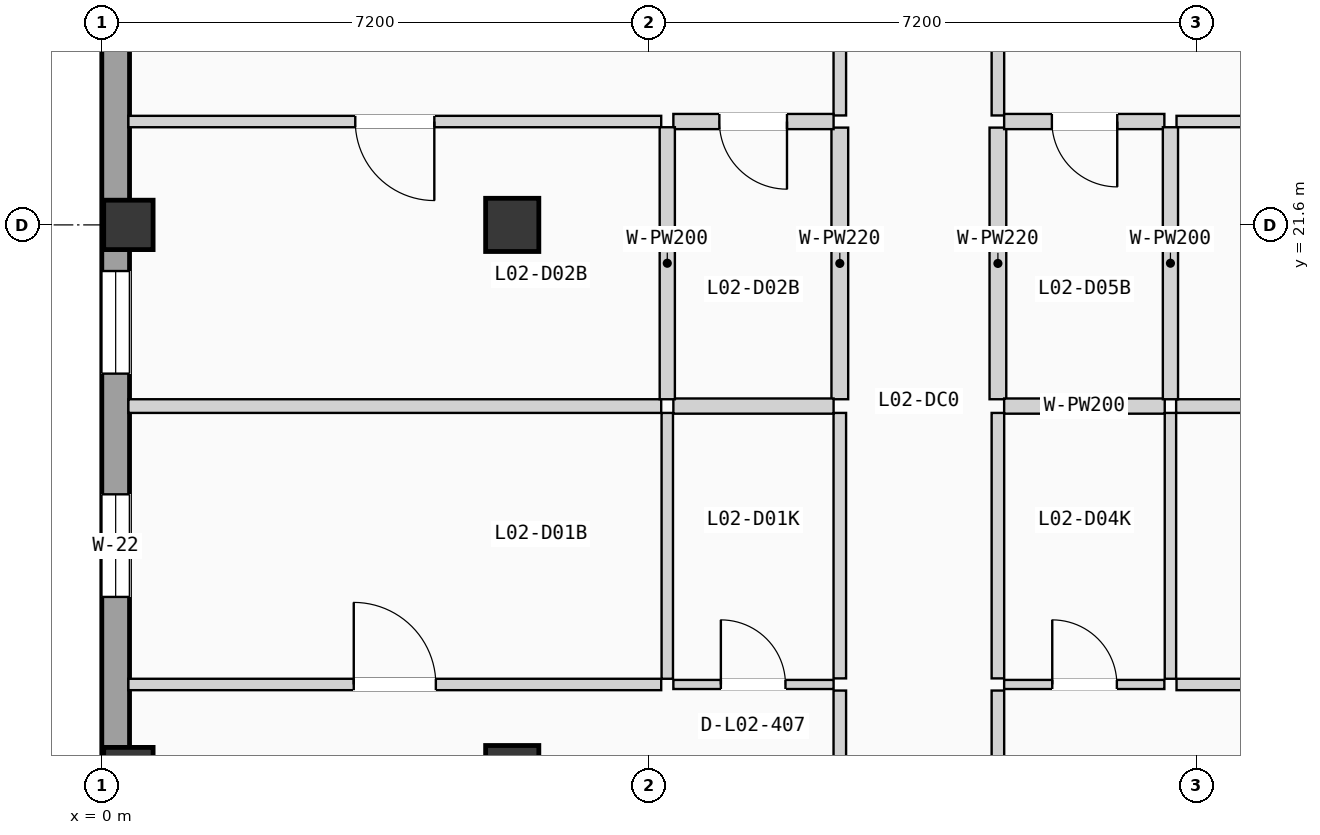
"""IFC4 building model, lengths in metres.
Left out: names, types, materials, properties, quantities, classifications, styles, units other than length and angle.
Written with IfcOpenShell. Run it as: python <this file> out.ifc"""

import sys

from ifc_helpers import new_model, si_unit, direction, frame, frame_2d, origin, origin_2d, place, context, subcontext, project, spatial, rectangle, extrude, element, fill, save


model = new_model("IFC4")
c1 = context("Model", 3, precision=1e-05, world=origin(), true_north=direction((0.0, 1.0)))
c2 = subcontext(c1, "Body", "Model", "MODEL_VIEW")
j1 = project(units=[si_unit("LENGTHUNIT", "METRE"), si_unit("PLANEANGLEUNIT", "RADIAN")], contexts=[c1])
p1 = place(None, origin())
s1 = spatial("IfcSite", under=j1, at=p1, CompositionType="ELEMENT")
p2 = place(p1, origin())
s2 = spatial("IfcBuilding", under=s1, at=p2, CompositionType="ELEMENT")
p3 = place(p2, frame((0.0, 0.0, 8.575)))
s3 = spatial("IfcBuildingStorey", under=s2, at=p3, CompositionType="ELEMENT", Elevation=8.575)
for number, where, z_axis, x_axis in (
    (1, (0.35, 14.4, 0.0), (0.0, 0.0, 1.0), (1.0, 0.0, 0.0)),
    (2, (0.35, 21.6, 0.0), (0.0, 0.0, 1.0), (1.0, 0.0, 0.0)),
):
    element("IfcColumn", number, at=place(p3, frame(where, z_axis=z_axis, x_axis=x_axis)), inside=s3, PredefinedType="COLUMN", context=c2, shape_type="SweptSolid", body=[
        extrude(rectangle(XDim=0.65, YDim=0.65, at=origin_2d()), origin(), (0.0, 0.0, 1.0), 3.5),
    ])
for number, where, z_axis, x_axis in (
    (3, (5.4, 14.4, 0.0), (0.0, 0.0, 1.0), (1.0, 0.0, 0.0)),
    (4, (5.4, 21.6, 0.0), (0.0, 0.0, 1.0), (1.0, 0.0, 0.0)),
):
    element("IfcColumn", number, at=place(p3, frame(where, z_axis=z_axis, x_axis=x_axis)), inside=s3, PredefinedType="COLUMN", context=c2, shape_type="SweptSolid", body=[
        extrude(rectangle(XDim=0.7, YDim=0.7, at=origin_2d()), origin(), (0.0, 0.0, 1.0), 3.5),
    ])
p4 = place(p3, frame((0.183, 0.365, 0.0), z_axis=(0.0, 0.0, 1.0), x_axis=(0.0, 1.0, 0.0)))
e5 = element("IfcWall", 5, at=p4, inside=s3, PredefinedType="SOLIDWALL", context=c2, shape_type="SweptSolid", body=[
    extrude(rectangle(XDim=49.67, YDim=0.365, at=frame_2d((24.835, 0.0))), origin(), (0.0, 0.0, 1.0), 3.24),
])
p5 = place(p4, frame((11.701, 0.0, 0.755)))
e6 = element("IfcOpeningElement", 6, at=p5, cuts=e5, PredefinedType="OPENING", context=c2, shape_type="SweptSolid", body=[
    extrude(rectangle(XDim=1.25, YDim=1.8, at=frame_2d((0.625, 0.9))), frame((0.0, 0.192, 0.0), z_axis=(0.0, -1.0, 0.0), x_axis=(1.0, 0.0, 0.0)), (0.0, 0.0, 1.0), 0.385),
])
p6 = place(p4, frame((8.306, 0.0, 0.9)))
e7 = element("IfcOpeningElement", 7, at=p6, cuts=e5, PredefinedType="OPENING", context=c2, shape_type="SweptSolid", body=[
    extrude(rectangle(XDim=1.35, YDim=1.2, at=frame_2d((0.675, 0.6))), frame((0.0, 0.192, 0.0), z_axis=(0.0, -1.0, 0.0), x_axis=(1.0, 0.0, 0.0)), (0.0, 0.0, 1.0), 0.385),
])
p7 = place(p4, frame((16.34, 0.0, 0.9)))
e8 = element("IfcOpeningElement", 8, at=p7, cuts=e5, PredefinedType="OPENING", context=c2, shape_type="SweptSolid", body=[
    extrude(rectangle(XDim=1.35, YDim=1.35, at=frame_2d((0.675, 0.675))), frame((0.0, 0.192, 0.0), z_axis=(0.0, -1.0, 0.0), x_axis=(1.0, 0.0, 0.0)), (0.0, 0.0, 1.0), 0.385),
])
p8 = place(p4, frame((24.16, 0.0, 0.9)))
e9 = element("IfcOpeningElement", 9, at=p8, cuts=e5, PredefinedType="OPENING", context=c2, shape_type="SweptSolid", body=[
    extrude(rectangle(XDim=1.35, YDim=1.5, at=frame_2d((0.675, 0.75))), frame((0.0, 0.192, 0.0), z_axis=(0.0, -1.0, 0.0), x_axis=(1.0, 0.0, 0.0)), (0.0, 0.0, 1.0), 0.385),
])
p9 = place(p4, frame((19.278, 0.0, 0.9)))
e10 = element("IfcOpeningElement", 10, at=p9, cuts=e5, PredefinedType="OPENING", context=c2, shape_type="SweptSolid", body=[
    extrude(rectangle(XDim=1.35, YDim=1.65, at=frame_2d((0.675, 0.825))), frame((0.0, 0.192, 0.0), z_axis=(0.0, -1.0, 0.0), x_axis=(1.0, 0.0, 0.0)), (0.0, 0.0, 1.0), 0.385),
])
p10 = place(p4, frame((29.042, 0.0, 0.755)))
e11 = element("IfcOpeningElement", 11, at=p10, cuts=e5, PredefinedType="OPENING", context=c2, shape_type="SweptSolid", body=[
    extrude(rectangle(XDim=1.35, YDim=1.8, at=frame_2d((0.675, 0.9))), frame((0.0, 0.192, 0.0), z_axis=(0.0, -1.0, 0.0), x_axis=(1.0, 0.0, 0.0)), (0.0, 0.0, 1.0), 0.385),
])
p11 = place(p4, frame((36.603, 0.0, 0.9)))
e12 = element("IfcOpeningElement", 12, at=p11, cuts=e5, PredefinedType="OPENING", context=c2, shape_type="SweptSolid", body=[
    extrude(rectangle(XDim=1.48, YDim=1.2, at=frame_2d((0.74, 0.6))), frame((0.0, 0.192, 0.0), z_axis=(0.0, -1.0, 0.0), x_axis=(1.0, 0.0, 0.0)), (0.0, 0.0, 1.0), 0.385),
])
p12 = place(p4, frame((31.915, 0.0, 0.9)))
e13 = element("IfcOpeningElement", 13, at=p12, cuts=e5, PredefinedType="OPENING", context=c2, shape_type="SweptSolid", body=[
    extrude(rectangle(XDim=1.48, YDim=1.35, at=frame_2d((0.74, 0.675))), frame((0.0, 0.192, 0.0), z_axis=(0.0, -1.0, 0.0), x_axis=(1.0, 0.0, 0.0)), (0.0, 0.0, 1.0), 0.385),
])
p13 = place(p4, frame((39.948, 0.0, 0.9)))
e14 = element("IfcOpeningElement", 14, at=p13, cuts=e5, PredefinedType="OPENING", context=c2, shape_type="SweptSolid", body=[
    extrude(rectangle(XDim=1.48, YDim=1.5, at=frame_2d((0.74, 0.75))), frame((0.0, 0.192, 0.0), z_axis=(0.0, -1.0, 0.0), x_axis=(1.0, 0.0, 0.0)), (0.0, 0.0, 1.0), 0.385),
])
p14 = place(p3, frame((9.71, 11.253, 0.0), z_axis=(0.0, 0.0, 1.0), x_axis=(0.0, 1.0, 0.0)))
e15 = element("IfcWall", 15, at=p14, inside=s3, PredefinedType="PARTITIONING", context=c2, shape_type="SweptSolid", body=[
    extrude(rectangle(XDim=4.22, YDim=0.165, at=frame_2d((2.11, 0.0))), origin(), (0.0, 0.0, 1.0), 3.22),
])
p15 = place(p14, frame((1.585, 0.0, 0.0)))
e16 = element("IfcOpeningElement", 16, at=p15, cuts=e15, PredefinedType="OPENING", context=c2, shape_type="SweptSolid", body=[
    extrude(rectangle(XDim=1.05, YDim=2.13, at=frame_2d((0.525, 1.065))), frame((0.0, 0.093, 0.0), z_axis=(0.0, -1.0, 0.0), x_axis=(1.0, 0.0, 0.0)), (0.0, 0.0, 1.0), 0.185),
])
p16 = place(p3, frame((9.71, 15.633, 0.0), z_axis=(0.0, 0.0, 1.0), x_axis=(0.0, 1.0, 0.0)))
e17 = element("IfcWall", 17, at=p16, inside=s3, PredefinedType="PARTITIONING", context=c2, shape_type="SweptSolid", body=[
    extrude(rectangle(XDim=3.493, YDim=0.165, at=frame_2d((1.747, 0.0))), origin(), (0.0, 0.0, 1.0), 3.22),
])
p17 = place(p3, frame((9.71, 23.04, 0.0), z_axis=(0.0, 0.0, 1.0), x_axis=(0.0, 1.0, 0.0)))
e18 = element("IfcWall", 18, at=p17, inside=s3, PredefinedType="PARTITIONING", context=c2, shape_type="SweptSolid", body=[
    extrude(rectangle(XDim=4.32, YDim=0.165, at=frame_2d((2.16, 0.0))), origin(), (0.0, 0.0, 1.0), 3.22),
])
p18 = place(p17, frame((1.635, 0.0, 0.0)))
e19 = element("IfcOpeningElement", 19, at=p18, cuts=e18, PredefinedType="OPENING", context=c2, shape_type="SweptSolid", body=[
    extrude(rectangle(XDim=1.05, YDim=2.13, at=frame_2d((0.525, 1.065))), frame((0.0, 0.093, 0.0), z_axis=(0.0, -1.0, 0.0), x_axis=(1.0, 0.0, 0.0)), (0.0, 0.0, 1.0), 0.185),
])
p19 = place(p3, frame((9.71, 19.306, 0.0), z_axis=(0.0, 0.0, 1.0), x_axis=(0.0, 1.0, 0.0)))
e20 = element("IfcWall", 20, at=p19, inside=s3, PredefinedType="PLUMBINGWALL", context=c2, shape_type="SweptSolid", body=[
    extrude(rectangle(XDim=3.574, YDim=0.22, at=frame_2d((1.787, 0.0))), origin(), (0.0, 0.0, 1.0), 3.22),
])
p20 = place(p3, frame((11.79, 11.253, 0.0), z_axis=(0.0, 0.0, 1.0), x_axis=(0.0, 1.0, 0.0)))
e21 = element("IfcWall", 21, at=p20, inside=s3, PredefinedType="PARTITIONING", context=c2, shape_type="SweptSolid", body=[
    extrude(rectangle(XDim=4.22, YDim=0.165, at=frame_2d((2.11, 0.0))), origin(), (0.0, 0.0, 1.0), 3.22),
])
p21 = place(p20, frame((1.585, 0.0, 0.0)))
e22 = element("IfcOpeningElement", 22, at=p21, cuts=e21, PredefinedType="OPENING", context=c2, shape_type="SweptSolid", body=[
    extrude(rectangle(XDim=1.05, YDim=2.13, at=frame_2d((0.525, 1.065))), frame((0.0, 0.093, 0.0), z_axis=(0.0, -1.0, 0.0), x_axis=(1.0, 0.0, 0.0)), (0.0, 0.0, 1.0), 0.185),
])
p22 = place(p3, frame((11.79, 15.633, 0.0), z_axis=(0.0, 0.0, 1.0), x_axis=(0.0, 1.0, 0.0)))
e23 = element("IfcWall", 23, at=p22, inside=s3, PredefinedType="PARTITIONING", context=c2, shape_type="SweptSolid", body=[
    extrude(rectangle(XDim=3.493, YDim=0.165, at=frame_2d((1.747, 0.0))), origin(), (0.0, 0.0, 1.0), 3.22),
])
p23 = place(p3, frame((11.79, 23.04, 0.0), z_axis=(0.0, 0.0, 1.0), x_axis=(0.0, 1.0, 0.0)))
e24 = element("IfcWall", 24, at=p23, inside=s3, PredefinedType="PARTITIONING", context=c2, shape_type="SweptSolid", body=[
    extrude(rectangle(XDim=4.32, YDim=0.165, at=frame_2d((2.16, 0.0))), origin(), (0.0, 0.0, 1.0), 3.22),
])
p24 = place(p23, frame((1.635, 0.0, 0.0)))
e25 = element("IfcOpeningElement", 25, at=p24, cuts=e24, PredefinedType="OPENING", context=c2, shape_type="SweptSolid", body=[
    extrude(rectangle(XDim=1.05, YDim=2.13, at=frame_2d((0.525, 1.065))), frame((0.0, 0.093, 0.0), z_axis=(0.0, -1.0, 0.0), x_axis=(1.0, 0.0, 0.0)), (0.0, 0.0, 1.0), 0.185),
])
p25 = place(p3, frame((11.79, 19.306, 0.0), z_axis=(0.0, 0.0, 1.0), x_axis=(0.0, 1.0, 0.0)))
e26 = element("IfcWall", 26, at=p25, inside=s3, PredefinedType="PLUMBINGWALL", context=c2, shape_type="SweptSolid", body=[
    extrude(rectangle(XDim=3.574, YDim=0.22, at=frame_2d((1.787, 0.0))), origin(), (0.0, 0.0, 1.0), 3.22),
])
p26 = place(p3, frame((7.52, 15.553, 0.0), z_axis=(0.0, 0.0, 1.0), x_axis=(1.0, 0.0, 0.0)))
e27 = element("IfcWall", 27, at=p26, inside=s3, PredefinedType="PARTITIONING", context=c2, shape_type="SweptSolid", body=[
    extrude(rectangle(XDim=2.108, YDim=0.12, at=frame_2d((1.054, 0.0))), origin(), (0.0, 0.0, 1.0), 3.22),
])
p27 = place(p26, frame((0.625, 0.0, 0.0)))
e28 = element("IfcOpeningElement", 28, at=p27, cuts=e27, PredefinedType="OPENING", context=c2, shape_type="SweptSolid", body=[
    extrude(rectangle(XDim=0.85, YDim=2.01, at=frame_2d((0.425, 1.005))), frame((0.0, 0.07, 0.0), z_axis=(0.0, -1.0, 0.0), x_axis=(1.0, 0.0, 0.0)), (0.0, 0.0, 1.0), 0.14),
])
p28 = place(p3, frame((0.35, 15.553, 0.0), z_axis=(0.0, 0.0, 1.0), x_axis=(1.0, 0.0, 0.0)))
e29 = element("IfcWall", 29, at=p28, inside=s3, PredefinedType="PARTITIONING", context=c2, shape_type="SweptSolid", body=[
    extrude(rectangle(XDim=7.01, YDim=0.15, at=frame_2d((3.505, 0.0))), origin(), (0.0, 0.0, 1.0), 3.22),
])
p29 = place(p28, frame((2.965, 0.0, 0.0)))
e30 = element("IfcOpeningElement", 30, at=p29, cuts=e29, PredefinedType="OPENING", context=c2, shape_type="SweptSolid", body=[
    extrude(rectangle(XDim=1.08, YDim=2.1, at=frame_2d((0.54, 1.05))), frame((0.0, 0.085, 0.0), z_axis=(0.0, -1.0, 0.0), x_axis=(1.0, 0.0, 0.0)), (0.0, 0.0, 1.0), 0.17),
])
p30 = place(p3, frame((7.44, 15.628, 0.0), z_axis=(0.0, 0.0, 1.0), x_axis=(0.0, 1.0, 0.0)))
e31 = element("IfcWall", 31, at=p30, inside=s3, PredefinedType="PARTITIONING", context=c2, shape_type="SweptSolid", body=[
    extrude(rectangle(XDim=3.498, YDim=0.15, at=frame_2d((1.749, 0.0))), origin(), (0.0, 0.0, 1.0), 3.22),
])
p31 = place(p3, frame((7.52, 19.216, 0.0), z_axis=(0.0, 0.0, 1.0), x_axis=(1.0, 0.0, 0.0)))
e32 = element("IfcWall", 32, at=p31, inside=s3, PredefinedType="PLUMBINGWALL", context=c2, shape_type="SweptSolid", body=[
    extrude(rectangle(XDim=2.108, YDim=0.2, at=frame_2d((1.054, 0.0))), origin(), (0.0, 0.0, 1.0), 3.22),
])
p32 = place(p3, frame((0.35, 19.216, 0.0), z_axis=(0.0, 0.0, 1.0), x_axis=(1.0, 0.0, 0.0)))
e33 = element("IfcWall", 33, at=p32, inside=s3, PredefinedType="PARTITIONING", context=c2, shape_type="SweptSolid", body=[
    extrude(rectangle(XDim=7.01, YDim=0.18, at=frame_2d((3.505, 0.0))), origin(), (0.0, 0.0, 1.0), 3.22),
])
p33 = place(p3, frame((7.52, 22.96, 0.0), z_axis=(0.0, 0.0, 1.0), x_axis=(1.0, 0.0, 0.0)))
e34 = element("IfcWall", 34, at=p33, inside=s3, PredefinedType="PLUMBINGWALL", context=c2, shape_type="SweptSolid", body=[
    extrude(rectangle(XDim=2.108, YDim=0.2, at=frame_2d((1.054, 0.0))), origin(), (0.0, 0.0, 1.0), 3.22),
])
p34 = place(p33, frame((0.605, 0.0, 0.0)))
e35 = element("IfcOpeningElement", 35, at=p34, cuts=e34, PredefinedType="OPENING", context=c2, shape_type="SweptSolid", body=[
    extrude(rectangle(XDim=0.89, YDim=2.03, at=frame_2d((0.445, 1.015))), frame((0.0, 0.11, 0.0), z_axis=(0.0, -1.0, 0.0), x_axis=(1.0, 0.0, 0.0)), (0.0, 0.0, 1.0), 0.22),
])
p35 = place(p3, frame((0.35, 22.96, 0.0), z_axis=(0.0, 0.0, 1.0), x_axis=(1.0, 0.0, 0.0)))
e36 = element("IfcWall", 36, at=p35, inside=s3, PredefinedType="PARTITIONING", context=c2, shape_type="SweptSolid", body=[
    extrude(rectangle(XDim=7.01, YDim=0.15, at=frame_2d((3.505, 0.0))), origin(), (0.0, 0.0, 1.0), 3.22),
])
p36 = place(p35, frame((2.985, 0.0, 0.0)))
e37 = element("IfcOpeningElement", 37, at=p36, cuts=e36, PredefinedType="OPENING", context=c2, shape_type="SweptSolid", body=[
    extrude(rectangle(XDim=1.04, YDim=2.08, at=frame_2d((0.52, 1.04))), frame((0.0, 0.085, 0.0), z_axis=(0.0, -1.0, 0.0), x_axis=(1.0, 0.0, 0.0)), (0.0, 0.0, 1.0), 0.17),
])
p37 = place(p3, frame((7.44, 19.306, 0.0), z_axis=(0.0, 0.0, 1.0), x_axis=(0.0, 1.0, 0.0)))
e38 = element("IfcWall", 38, at=p37, inside=s3, PredefinedType="PLUMBINGWALL", context=c2, shape_type="SweptSolid", body=[
    extrude(rectangle(XDim=3.579, YDim=0.2, at=frame_2d((1.79, 0.0))), origin(), (0.0, 0.0, 1.0), 3.22),
])
p38 = place(p3, frame((11.872, 15.553, 0.0), z_axis=(0.0, 0.0, 1.0), x_axis=(1.0, 0.0, 0.0)))
e39 = element("IfcWall", 39, at=p38, inside=s3, PredefinedType="PARTITIONING", context=c2, shape_type="SweptSolid", body=[
    extrude(rectangle(XDim=2.108, YDim=0.12, at=frame_2d((1.054, 0.0))), origin(), (0.0, 0.0, 1.0), 3.22),
])
p39 = place(p38, frame((0.633, 0.0, 0.0)))
e40 = element("IfcOpeningElement", 40, at=p39, cuts=e39, PredefinedType="OPENING", context=c2, shape_type="SweptSolid", body=[
    extrude(rectangle(XDim=0.85, YDim=2.01, at=frame_2d((0.425, 1.005))), frame((0.0, 0.07, 0.0), z_axis=(0.0, -1.0, 0.0), x_axis=(1.0, 0.0, 0.0)), (0.0, 0.0, 1.0), 0.14),
])
p40 = place(p3, frame((14.14, 15.553, 0.0), z_axis=(0.0, 0.0, 1.0), x_axis=(1.0, 0.0, 0.0)))
e41 = element("IfcWall", 41, at=p40, inside=s3, PredefinedType="PARTITIONING", context=c2, shape_type="SweptSolid", body=[
    extrude(rectangle(XDim=7.11, YDim=0.15, at=frame_2d((3.555, 0.0))), origin(), (0.0, 0.0, 1.0), 3.22),
])
p41 = place(p40, frame((3.015, 0.0, 0.0)))
e42 = element("IfcOpeningElement", 42, at=p41, cuts=e41, PredefinedType="OPENING", context=c2, shape_type="SweptSolid", body=[
    extrude(rectangle(XDim=1.08, YDim=2.1, at=frame_2d((0.54, 1.05))), frame((0.0, 0.085, 0.0), z_axis=(0.0, -1.0, 0.0), x_axis=(1.0, 0.0, 0.0)), (0.0, 0.0, 1.0), 0.17),
])
p42 = place(p3, frame((14.06, 15.628, 0.0), z_axis=(0.0, 0.0, 1.0), x_axis=(0.0, 1.0, 0.0)))
e43 = element("IfcWall", 43, at=p42, inside=s3, PredefinedType="PARTITIONING", context=c2, shape_type="SweptSolid", body=[
    extrude(rectangle(XDim=3.498, YDim=0.15, at=frame_2d((1.749, 0.0))), origin(), (0.0, 0.0, 1.0), 3.22),
])
p43 = place(p3, frame((11.872, 19.216, 0.0), z_axis=(0.0, 0.0, 1.0), x_axis=(1.0, 0.0, 0.0)))
e44 = element("IfcWall", 44, at=p43, inside=s3, PredefinedType="PLUMBINGWALL", context=c2, shape_type="SweptSolid", body=[
    extrude(rectangle(XDim=2.113, YDim=0.2, at=frame_2d((1.057, 0.0))), origin(), (0.0, 0.0, 1.0), 3.22),
])
p44 = place(p3, frame((14.135, 19.216, 0.0), z_axis=(0.0, 0.0, 1.0), x_axis=(1.0, 0.0, 0.0)))
e45 = element("IfcWall", 45, at=p44, inside=s3, PredefinedType="PARTITIONING", context=c2, shape_type="SweptSolid", body=[
    extrude(rectangle(XDim=7.115, YDim=0.18, at=frame_2d((3.558, 0.0))), origin(), (0.0, 0.0, 1.0), 3.22),
])
p45 = place(p3, frame((11.872, 22.96, 0.0), z_axis=(0.0, 0.0, 1.0), x_axis=(1.0, 0.0, 0.0)))
e46 = element("IfcWall", 46, at=p45, inside=s3, PredefinedType="PLUMBINGWALL", context=c2, shape_type="SweptSolid", body=[
    extrude(rectangle(XDim=2.108, YDim=0.2, at=frame_2d((1.054, 0.0))), origin(), (0.0, 0.0, 1.0), 3.22),
])
p46 = place(p45, frame((0.628, 0.0, 0.0)))
e47 = element("IfcOpeningElement", 47, at=p46, cuts=e46, PredefinedType="OPENING", context=c2, shape_type="SweptSolid", body=[
    extrude(rectangle(XDim=0.86, YDim=2.0, at=frame_2d((0.43, 1.0))), frame((0.0, 0.11, 0.0), z_axis=(0.0, -1.0, 0.0), x_axis=(1.0, 0.0, 0.0)), (0.0, 0.0, 1.0), 0.22),
])
p47 = place(p3, frame((14.14, 22.96, 0.0), z_axis=(0.0, 0.0, 1.0), x_axis=(1.0, 0.0, 0.0)))
e48 = element("IfcWall", 48, at=p47, inside=s3, PredefinedType="PARTITIONING", context=c2, shape_type="SweptSolid", body=[
    extrude(rectangle(XDim=7.11, YDim=0.15, at=frame_2d((3.555, 0.0))), origin(), (0.0, 0.0, 1.0), 3.22),
])
p48 = place(p47, frame((3.035, 0.0, 0.0)))
e49 = element("IfcOpeningElement", 49, at=p48, cuts=e48, PredefinedType="OPENING", context=c2, shape_type="SweptSolid", body=[
    extrude(rectangle(XDim=1.04, YDim=2.08, at=frame_2d((0.52, 1.04))), frame((0.0, 0.085, 0.0), z_axis=(0.0, -1.0, 0.0), x_axis=(1.0, 0.0, 0.0)), (0.0, 0.0, 1.0), 0.17),
])
p49 = place(p3, frame((14.06, 19.306, 0.0), z_axis=(0.0, 0.0, 1.0), x_axis=(0.0, 1.0, 0.0)))
e50 = element("IfcWall", 50, at=p49, inside=s3, PredefinedType="PLUMBINGWALL", context=c2, shape_type="SweptSolid", body=[
    extrude(rectangle(XDim=3.579, YDim=0.2, at=frame_2d((1.79, 0.0))), origin(), (0.0, 0.0, 1.0), 3.22),
])
p50 = place(p7, origin())
e51 = element("IfcWindow", 51, at=p50, inside=s3, PartitioningType="SINGLE_PANEL", PredefinedType="WINDOW", context=c2, shape_type="SweptSolid", body=[
    extrude(rectangle(XDim=1.35, YDim=1.35, at=frame_2d((0.675, 0.675))), frame((0.0, 0.03, 0.0), z_axis=(0.0, -1.0, 0.0), x_axis=(1.0, 0.0, 0.0)), (0.0, 0.0, 1.0), 0.06),
])
fill(e8, e51)
p51 = place(p9, origin())
e52 = element("IfcWindow", 52, at=p51, inside=s3, PartitioningType="SINGLE_PANEL", PredefinedType="WINDOW", context=c2, shape_type="SweptSolid", body=[
    extrude(rectangle(XDim=1.35, YDim=1.65, at=frame_2d((0.675, 0.825))), frame((0.0, 0.03, 0.0), z_axis=(0.0, -1.0, 0.0), x_axis=(1.0, 0.0, 0.0)), (0.0, 0.0, 1.0), 0.06),
])
fill(e10, e52)
p52 = place(p27, origin())
e53 = element("IfcDoor", 53, at=p52, inside=s3, OperationType="SINGLE_SWING_LEFT", PredefinedType="DOOR", context=c2, shape_type="SweptSolid", body=[
    extrude(rectangle(XDim=0.85, YDim=2.01, at=frame_2d((0.425, 1.005))), frame((0.0, 0.025, 0.0), z_axis=(0.0, -1.0, 0.0), x_axis=(1.0, 0.0, 0.0)), (0.0, 0.0, 1.0), 0.05),
])
fill(e28, e53)
p53 = place(p29, origin())
e54 = element("IfcDoor", 54, at=p53, inside=s3, OperationType="SINGLE_SWING_LEFT", PredefinedType="DOOR", context=c2, shape_type="SweptSolid", body=[
    extrude(rectangle(XDim=1.08, YDim=2.1, at=frame_2d((0.54, 1.05))), frame((0.0, 0.025, 0.0), z_axis=(0.0, -1.0, 0.0), x_axis=(1.0, 0.0, 0.0)), (0.0, 0.0, 1.0), 0.05),
])
fill(e30, e54)
p54 = place(p34, frame((0.89, 0.0, 0.0), z_axis=(0.0, 0.0, 1.0), x_axis=(-1.0, 0.0, 0.0)))
e55 = element("IfcDoor", 55, at=p54, inside=s3, OperationType="SINGLE_SWING_RIGHT", PredefinedType="DOOR", context=c2, shape_type="SweptSolid", body=[
    extrude(rectangle(XDim=0.89, YDim=2.03, at=frame_2d((0.445, 1.015))), frame((0.0, 0.025, 0.0), z_axis=(0.0, -1.0, 0.0), x_axis=(1.0, 0.0, 0.0)), (0.0, 0.0, 1.0), 0.05),
])
fill(e35, e55)
p55 = place(p36, frame((1.04, 0.0, 0.0), z_axis=(0.0, 0.0, 1.0), x_axis=(-1.0, 0.0, 0.0)))
e56 = element("IfcDoor", 56, at=p55, inside=s3, OperationType="SINGLE_SWING_RIGHT", PredefinedType="DOOR", context=c2, shape_type="SweptSolid", body=[
    extrude(rectangle(XDim=1.04, YDim=2.08, at=frame_2d((0.52, 1.04))), frame((0.0, 0.025, 0.0), z_axis=(0.0, -1.0, 0.0), x_axis=(1.0, 0.0, 0.0)), (0.0, 0.0, 1.0), 0.05),
])
fill(e37, e56)
p56 = place(p39, origin())
e57 = element("IfcDoor", 57, at=p56, inside=s3, OperationType="SINGLE_SWING_LEFT", PredefinedType="DOOR", context=c2, shape_type="SweptSolid", body=[
    extrude(rectangle(XDim=0.85, YDim=2.01, at=frame_2d((0.425, 1.005))), frame((0.0, 0.025, 0.0), z_axis=(0.0, -1.0, 0.0), x_axis=(1.0, 0.0, 0.0)), (0.0, 0.0, 1.0), 0.05),
])
fill(e40, e57)
p57 = place(p46, frame((0.86, 0.0, 0.0), z_axis=(0.0, 0.0, 1.0), x_axis=(-1.0, 0.0, 0.0)))
e58 = element("IfcDoor", 58, at=p57, inside=s3, OperationType="SINGLE_SWING_RIGHT", PredefinedType="DOOR", context=c2, shape_type="SweptSolid", body=[
    extrude(rectangle(XDim=0.86, YDim=2.0, at=frame_2d((0.43, 1.0))), frame((0.0, 0.025, 0.0), z_axis=(0.0, -1.0, 0.0), x_axis=(1.0, 0.0, 0.0)), (0.0, 0.0, 1.0), 0.05),
])
fill(e47, e58)
save(model, sys.argv[1])
